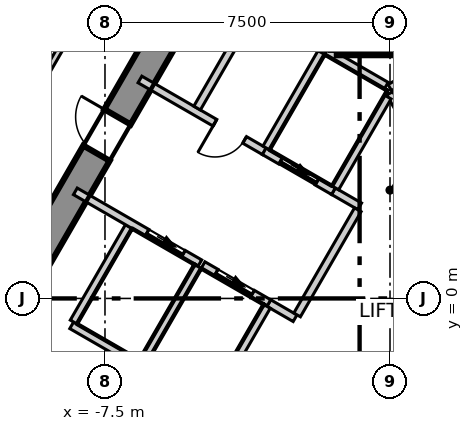
"""IFC4 building model, lengths in metres.
Left out: names, types, materials, properties, quantities, classifications, styles, units other than length and angle.
Written with IfcOpenShell. Run it as: python <this file> out.ifc"""

import sys

from ifc_helpers import new_model, si_unit, direction, frame, frame_2d, origin, place, context, subcontext, project, spatial, polyline, rectangle, outline, extrude, element, fill, save


model = new_model("IFC4")
c1 = context("Model", 3, precision=1e-05, world=origin(), true_north=direction((0.0, 1.0)))
c2 = subcontext(c1, "Body", "Model", "MODEL_VIEW")
j1 = project(units=[si_unit("LENGTHUNIT", "METRE"), si_unit("PLANEANGLEUNIT", "RADIAN")], contexts=[c1])
p1 = place(None, origin())
s1 = spatial("IfcSite", under=j1, at=p1, CompositionType="ELEMENT")
p2 = place(p1, origin())
s2 = spatial("IfcBuilding", under=s1, at=p2, CompositionType="ELEMENT")
p3 = place(p2, frame((0.0, 0.0, 104.3)))
s3 = spatial("IfcBuildingStorey", under=s2, at=p3, CompositionType="ELEMENT", Elevation=104.3)
p4 = place(p3, frame((-1.674, 14.3, -0.3), z_axis=(0.0, 0.0, 1.0), x_axis=(-0.499995765644, -0.866027848477, 0.0)))
e1 = element("IfcWall", 1, at=p4, inside=s3, PredefinedType="SHEAR", context=c2, shape_type="SweptSolid", body=[
    extrude(outline(polyline([(-0.231, -0.4), (1.732, -0.4), (3.695, -0.4), (5.658, -0.4), (7.621, -0.4), (9.584, -0.4), (11.547, -0.4), (13.51, -0.4), (15.473, -0.4), (17.436, -0.4), (19.399, -0.4), (21.362, -0.4), (23.325, -0.4), (22.863, 0.4), (20.977, 0.4), (19.091, 0.4), (17.205, 0.4), (15.319, 0.4), (13.433, 0.4), (11.547, 0.4), (9.661, 0.4), (7.775, 0.4), (5.889, 0.4), (4.003, 0.4), (2.117, 0.4), (0.231, 0.4), (-0.231, -0.4)])), origin(), (0.0, 0.0, 1.0), 4.0),
])
p5 = place(p4, frame((10.997, 0.0, 0.3)))
e2 = element("IfcOpeningElement", 2, at=p5, cuts=e1, PredefinedType="OPENING", context=c2, shape_type="SweptSolid", body=[
    extrude(rectangle(XDim=1.1, YDim=2.1, at=frame_2d((0.55, 1.05))), frame((0.0, 0.41, 0.0), z_axis=(0.0, -1.0, 0.0), x_axis=(1.0, 0.0, 0.0)), (0.0, 0.0, 1.0), 0.82),
])
p6 = place(p4, frame((4.474, 0.0, 0.3)))
e3 = element("IfcOpeningElement", 3, at=p6, cuts=e1, PredefinedType="OPENING", context=c2, shape_type="SweptSolid", body=[
    extrude(rectangle(XDim=0.9, YDim=2.1, at=frame_2d((0.45, 1.05))), frame((0.0, 0.41, 0.0), z_axis=(0.0, -1.0, 0.0), x_axis=(1.0, 0.0, 0.0)), (0.0, 0.0, 1.0), 0.82),
])
p7 = place(p3, frame((-3.2, 35.691, 0.0), z_axis=(0.0, 0.0, 1.0), x_axis=(-0.500010127185, -0.866019556773, 0.0)))
e4 = element("IfcWall", 4, at=p7, inside=s3, PredefinedType="ELEMENTEDWALL", context=c2, shape_type="SweptSolid", body=[
    extrude(rectangle(XDim=58.599, YDim=0.2, at=frame_2d((29.299, 0.0))), origin(), (0.0, 0.0, 1.0), 3.7),
])
p8 = place(p7, frame((2.353, 0.0, 0.9)))
e5 = element("IfcOpeningElement", 5, at=p8, cuts=e4, PredefinedType="OPENING", context=c2, shape_type="SweptSolid", body=[
    extrude(rectangle(XDim=4.9, YDim=2.5, at=frame_2d((2.45, 1.25))), frame((0.0, 0.11, 0.0), z_axis=(0.0, -1.0, 0.0), x_axis=(1.0, 0.0, 0.0)), (0.0, 0.0, 1.0), 0.22),
])
p9 = place(p7, frame((9.355, 0.0, 0.9)))
e6 = element("IfcOpeningElement", 6, at=p9, cuts=e4, PredefinedType="OPENING", context=c2, shape_type="SweptSolid", body=[
    extrude(rectangle(XDim=4.9, YDim=2.5, at=frame_2d((2.45, 1.25))), frame((0.0, 0.11, 0.0), z_axis=(0.0, -1.0, 0.0), x_axis=(1.0, 0.0, 0.0)), (0.0, 0.0, 1.0), 0.22),
])
p10 = place(p7, frame((16.357, 0.0, 0.9)))
e7 = element("IfcOpeningElement", 7, at=p10, cuts=e4, PredefinedType="OPENING", context=c2, shape_type="SweptSolid", body=[
    extrude(rectangle(XDim=4.9, YDim=2.5, at=frame_2d((2.45, 1.25))), frame((0.0, 0.11, 0.0), z_axis=(0.0, -1.0, 0.0), x_axis=(1.0, 0.0, 0.0)), (0.0, 0.0, 1.0), 0.22),
])
p11 = place(p7, frame((23.358, 0.0, 0.9)))
e8 = element("IfcOpeningElement", 8, at=p11, cuts=e4, PredefinedType="OPENING", context=c2, shape_type="SweptSolid", body=[
    extrude(rectangle(XDim=4.9, YDim=2.5, at=frame_2d((2.45, 1.25))), frame((0.0, 0.11, 0.0), z_axis=(0.0, -1.0, 0.0), x_axis=(1.0, 0.0, 0.0)), (0.0, 0.0, 1.0), 0.22),
])
p12 = place(p7, frame((30.36, 0.0, 0.9)))
e9 = element("IfcOpeningElement", 9, at=p12, cuts=e4, PredefinedType="OPENING", context=c2, shape_type="SweptSolid", body=[
    extrude(rectangle(XDim=4.9, YDim=2.5, at=frame_2d((2.45, 1.25))), frame((0.0, 0.11, 0.0), z_axis=(0.0, -1.0, 0.0), x_axis=(1.0, 0.0, 0.0)), (0.0, 0.0, 1.0), 0.22),
])
p13 = place(p7, frame((37.362, 0.0, 0.9)))
e10 = element("IfcOpeningElement", 10, at=p13, cuts=e4, PredefinedType="OPENING", context=c2, shape_type="SweptSolid", body=[
    extrude(rectangle(XDim=4.9, YDim=2.5, at=frame_2d((2.45, 1.25))), frame((0.0, 0.11, 0.0), z_axis=(0.0, -1.0, 0.0), x_axis=(1.0, 0.0, 0.0)), (0.0, 0.0, 1.0), 0.22),
])
p14 = place(p7, frame((44.363, 0.0, 0.9)))
e11 = element("IfcOpeningElement", 11, at=p14, cuts=e4, PredefinedType="OPENING", context=c2, shape_type="SweptSolid", body=[
    extrude(rectangle(XDim=4.9, YDim=2.5, at=frame_2d((2.45, 1.25))), frame((0.0, 0.11, 0.0), z_axis=(0.0, -1.0, 0.0), x_axis=(1.0, 0.0, 0.0)), (0.0, 0.0, 1.0), 0.22),
])
p15 = place(p7, frame((51.365, 0.0, 0.9)))
e12 = element("IfcOpeningElement", 12, at=p15, cuts=e4, PredefinedType="OPENING", context=c2, shape_type="SweptSolid", body=[
    extrude(rectangle(XDim=4.9, YDim=2.5, at=frame_2d((2.45, 1.25))), frame((0.0, 0.11, 0.0), z_axis=(0.0, -1.0, 0.0), x_axis=(1.0, 0.0, 0.0)), (0.0, 0.0, 1.0), 0.22),
])
p16 = place(p3, frame((-18.631, -10.669, 0.0), z_axis=(0.0, 0.0, 1.0), x_axis=(0.500015596868, 0.866016398741, 0.0)))
e13 = element("IfcWall", 13, at=p16, inside=s3, PredefinedType="PARTITIONING", context=c2, shape_type="SweptSolid", body=[
    extrude(rectangle(XDim=24.656, YDim=0.15, at=frame_2d((12.328, 0.0))), origin(), (0.0, 0.0, 1.0), 3.7),
])
p17 = place(p16, frame((17.507, 0.0, 0.0)))
e14 = element("IfcOpeningElement", 14, at=p17, cuts=e13, PredefinedType="OPENING", context=c2, shape_type="SweptSolid", body=[
    extrude(rectangle(XDim=1.1, YDim=2.1, at=frame_2d((0.55, 1.05))), frame((0.0, 0.085, 0.0), z_axis=(0.0, -1.0, 0.0), x_axis=(1.0, 0.0, 0.0)), (0.0, 0.0, 1.0), 0.17),
])
p18 = place(p16, frame((5.104, 0.0, 0.0)))
e15 = element("IfcOpeningElement", 15, at=p18, cuts=e13, PredefinedType="OPENING", context=c2, shape_type="SweptSolid", body=[
    extrude(rectangle(XDim=1.1, YDim=2.1, at=frame_2d((0.55, 1.05))), frame((0.0, 0.085, 0.0), z_axis=(0.0, -1.0, 0.0), x_axis=(1.0, 0.0, 0.0)), (0.0, 0.0, 1.0), 0.17),
])
p19 = place(p3, frame((0.076, 21.468, 0.0), z_axis=(0.0, 0.0, 1.0), x_axis=(0.500024127084, -0.866011473558, 0.0)))
e16 = element("IfcWall", 16, at=p19, inside=s3, PredefinedType="PARTITIONING", context=c2, shape_type="SweptSolid", body=[
    extrude(rectangle(XDim=17.654, YDim=0.15, at=frame_2d((8.827, 0.0))), origin(), (0.0, 0.0, 1.0), 3.7),
])
p20 = place(p19, frame((8.104, 0.0, 0.0)))
e17 = element("IfcOpeningElement", 17, at=p20, cuts=e16, PredefinedType="OPENING", context=c2, shape_type="SweptSolid", body=[
    extrude(rectangle(XDim=1.1, YDim=2.1, at=frame_2d((0.55, 1.05))), frame((0.0, 0.085, 0.0), z_axis=(0.0, -1.0, 0.0), x_axis=(1.0, 0.0, 0.0)), (0.0, 0.0, 1.0), 0.17),
])
p21 = place(p19, frame((13.504, 0.0, 0.0)))
e18 = element("IfcOpeningElement", 18, at=p21, cuts=e16, PredefinedType="OPENING", context=c2, shape_type="SweptSolid", body=[
    extrude(rectangle(XDim=0.9, YDim=2.1, at=frame_2d((0.45, 1.05))), frame((0.0, 0.085, 0.0), z_axis=(0.0, -1.0, 0.0), x_axis=(1.0, 0.0, 0.0)), (0.0, 0.0, 1.0), 0.17),
])
p22 = place(p19, frame((1.6, 0.0, 0.0)))
e19 = element("IfcOpeningElement", 19, at=p22, cuts=e16, PredefinedType="OPENING", context=c2, shape_type="SweptSolid", body=[
    extrude(rectangle(XDim=1.1, YDim=2.1, at=frame_2d((0.55, 1.05))), frame((0.0, 0.085, 0.0), z_axis=(0.0, -1.0, 0.0), x_axis=(1.0, 0.0, 0.0)), (0.0, 0.0, 1.0), 0.17),
])
p23 = place(p3, frame((-8.376, -0.707, 0.0), z_axis=(0.0, 0.0, 1.0), x_axis=(0.866067520717, -0.499927044236, 0.0)))
e20 = element("IfcWall", 20, at=p23, inside=s3, PredefinedType="SOLIDWALL", context=c2, shape_type="SweptSolid", body=[
    extrude(rectangle(XDim=2.1, YDim=0.2, at=frame_2d((1.05, 0.0))), origin(), (0.0, 0.0, 1.0), 3.7),
])
p24 = place(p3, frame((-8.326, -0.62, 0.0), z_axis=(0.0, 0.0, 1.0), x_axis=(0.500023687443, 0.866011727401, 0.0)))
e21 = element("IfcWall", 21, at=p24, inside=s3, PredefinedType="SOLIDWALL", context=c2, shape_type="SweptSolid", body=[
    extrude(rectangle(XDim=2.9, YDim=0.2, at=frame_2d((1.45, 0.0))), origin(), (0.0, 0.0, 1.0), 3.7),
])
p25 = place(p3, frame((-0.002, 5.541, 0.0), z_axis=(0.0, 0.0, 1.0), x_axis=(0.86600155993, 0.500041296494, 0.0)))
e22 = element("IfcWall", 22, at=p25, inside=s3, PredefinedType="SOLIDWALL", context=c2, shape_type="SweptSolid", body=[
    extrude(rectangle(XDim=4.132, YDim=0.2, at=frame_2d((2.066, 0.0))), origin(), (0.0, 0.0, 1.0), 3.7),
])
p26 = place(p3, frame((0.0, 5.4, 0.0), z_axis=(0.0, 0.0, 1.0), x_axis=(0.500103862429, -0.865965430478, 0.0)))
e23 = element("IfcWall", 23, at=p26, inside=s3, PredefinedType="SOLIDWALL", context=c2, shape_type="SweptSolid", body=[
    extrude(rectangle(XDim=2.973, YDim=0.2, at=frame_2d((1.487, 0.0))), origin(), (0.0, 0.0, 1.0), 3.7),
])
p27 = place(p26, frame((0.937, 0.0, 0.0)))
e24 = element("IfcOpeningElement", 24, at=p27, cuts=e23, PredefinedType="OPENING", context=c2, shape_type="SweptSolid", body=[
    extrude(rectangle(XDim=1.1, YDim=2.1, at=frame_2d((0.55, 1.05))), frame((0.0, 0.11, 0.0), z_axis=(0.0, -1.0, 0.0), x_axis=(1.0, 0.0, 0.0)), (0.0, 0.0, 1.0), 0.22),
])
p28 = place(p3, frame((-8.28, 2.818, 0.0), z_axis=(0.0, 0.0, 1.0), x_axis=(0.86600175068, -0.50004096614, 0.0)))
e25 = element("IfcWall", 25, at=p28, inside=s3, PredefinedType="SOLIDWALL", context=c2, shape_type="SweptSolid", body=[
    extrude(rectangle(XDim=3.782, YDim=0.2, at=frame_2d((1.891, 0.0))), origin(), (0.0, 0.0, 1.0), 3.7),
])
p29 = place(p28, frame((2.18, 0.0, 0.0)))
e26 = element("IfcOpeningElement", 26, at=p29, cuts=e25, PredefinedType="OPENING", context=c2, shape_type="SweptSolid", body=[
    extrude(rectangle(XDim=1.1, YDim=2.1, at=frame_2d((0.55, 1.05))), frame((0.0, 0.11, 0.0), z_axis=(0.0, -1.0, 0.0), x_axis=(1.0, 0.0, 0.0)), (0.0, 0.0, 1.0), 0.22),
])
p30 = place(p3, frame((-3.188, -0.122, 0.0), z_axis=(0.0, 0.0, 1.0), x_axis=(0.865705793592, -0.50055317294, 0.0)))
e27 = element("IfcWall", 27, at=p30, inside=s3, PredefinedType="SOLIDWALL", context=c2, shape_type="SweptSolid", body=[
    extrude(rectangle(XDim=0.797, YDim=0.2, at=frame_2d((0.398, 0.0))), origin(), (0.0, 0.0, 1.0), 3.7),
])
p31 = place(p3, frame((-6.58, 5.762, 0.0), z_axis=(0.0, 0.0, 1.0), x_axis=(0.866029704776, -0.49999255039, 0.0)))
e28 = element("IfcWall", 28, at=p31, inside=s3, PredefinedType="SOLIDWALL", context=c2, shape_type="SweptSolid", body=[
    extrude(rectangle(XDim=3.782, YDim=0.2, at=frame_2d((1.891, 0.0))), origin(), (0.0, 0.0, 1.0), 3.7),
])
p32 = place(p31, frame((2.279, 0.0, 0.0)))
e29 = element("IfcOpeningElement", 29, at=p32, cuts=e28, PredefinedType="OPENING", context=c2, shape_type="SweptSolid", body=[
    extrude(rectangle(XDim=0.9, YDim=2.1, at=frame_2d((0.45, 1.05))), frame((0.0, 0.11, 0.0), z_axis=(0.0, -1.0, 0.0), x_axis=(1.0, 0.0, 0.0)), (0.0, 0.0, 1.0), 0.22),
])
p33 = place(p3, frame((-1.488, 2.822, 0.0), z_axis=(0.0, 0.0, 1.0), x_axis=(0.866236612152, -0.499633997809, 0.0)))
e30 = element("IfcWall", 30, at=p33, inside=s3, PredefinedType="SOLIDWALL", context=c2, shape_type="SweptSolid", body=[
    extrude(rectangle(XDim=0.796, YDim=0.2, at=frame_2d((0.398, 0.0))), origin(), (0.0, 0.0, 1.0), 3.7),
])
p34 = place(p3, frame((-5.076, 5.009, 0.0), z_axis=(0.0, 0.0, 1.0), x_axis=(0.50002537861, 0.866010750942, 0.0)))
e31 = element("IfcWall", 31, at=p34, inside=s3, PredefinedType="SOLIDWALL", context=c2, shape_type="SweptSolid", body=[
    extrude(rectangle(XDim=3.0, YDim=0.2, at=frame_2d((1.5, 0.0))), origin(), (0.0, 0.0, 1.0), 3.7),
])
p35 = place(p3, frame((-3.489, 7.557, 0.0), z_axis=(0.0, 0.0, 1.0), x_axis=(0.866010750942, -0.50002537861, 0.0)))
e32 = element("IfcWall", 32, at=p35, inside=s3, PredefinedType="SOLIDWALL", context=c2, shape_type="SweptSolid", body=[
    extrude(rectangle(XDim=2.0, YDim=0.2, at=frame_2d((1.0, 0.0))), origin(), (0.0, 0.0, 1.0), 3.7),
])
p36 = place(p3, frame((-2.444, -0.433, 0.0), z_axis=(0.0, 0.0, 1.0), x_axis=(0.500035624827, 0.866004834804, 0.0)))
e33 = element("IfcWall", 33, at=p36, inside=s3, PredefinedType="SOLIDWALL", context=c2, shape_type="SweptSolid", body=[
    extrude(rectangle(XDim=3.194, YDim=0.2, at=frame_2d((1.597, 0.0))), origin(), (0.0, 0.0, 1.0), 3.7),
])
p37 = place(p3, frame((-6.507, -1.67, 0.0), z_axis=(0.0, 0.0, 1.0), x_axis=(0.50012328804, 0.865954211699, 0.0)))
e34 = element("IfcWall", 34, at=p37, inside=s3, PredefinedType="SOLIDWALL", context=c2, shape_type="SweptSolid", body=[
    extrude(rectangle(XDim=2.9, YDim=0.2, at=frame_2d((1.45, 0.0))), origin(), (0.0, 0.0, 1.0), 3.7),
])
p38 = place(p3, frame((-4.92, 0.878, 0.0), z_axis=(0.0, 0.0, 1.0), x_axis=(0.866010750942, -0.50002537861, 0.0)))
e35 = element("IfcWall", 35, at=p38, inside=s3, PredefinedType="SOLIDWALL", context=c2, shape_type="SweptSolid", body=[
    extrude(rectangle(XDim=2.0, YDim=0.2, at=frame_2d((1.0, 0.0))), origin(), (0.0, 0.0, 1.0), 3.7),
])
p39 = place(p38, frame((0.4, 0.0, 0.0)))
e36 = element("IfcOpeningElement", 36, at=p39, cuts=e35, PredefinedType="OPENING", context=c2, shape_type="SweptSolid", body=[
    extrude(rectangle(XDim=1.1, YDim=2.1, at=frame_2d((0.55, 1.05))), frame((0.0, 0.11, 0.0), z_axis=(0.0, -1.0, 0.0), x_axis=(1.0, 0.0, 0.0)), (0.0, 0.0, 1.0), 0.22),
])
p40 = place(p3, frame((-4.619, -2.6, 0.0), z_axis=(0.0, 0.0, 1.0), x_axis=(0.50009492287, 0.865970593103, 0.0)))
e37 = element("IfcWall", 37, at=p40, inside=s3, PredefinedType="SOLIDWALL", context=c2, shape_type="SweptSolid", body=[
    extrude(rectangle(XDim=2.761, YDim=0.2, at=frame_2d((1.381, 0.0))), origin(), (0.0, 0.0, 1.0), 3.7),
])
p41 = place(p3, frame((-3.309, 3.873, 0.0), z_axis=(0.0, 0.0, 1.0), x_axis=(0.866098583652, -0.499873227325, 0.0)))
e38 = element("IfcWall", 38, at=p41, inside=s3, PredefinedType="SOLIDWALL", context=c2, shape_type="SweptSolid", body=[
    extrude(rectangle(XDim=2.103, YDim=0.2, at=frame_2d((1.051, 0.0))), origin(), (0.0, 0.0, 1.0), 3.7),
])
p42 = place(p41, frame((0.502, 0.0, 0.0)))
e39 = element("IfcOpeningElement", 39, at=p42, cuts=e38, PredefinedType="OPENING", context=c2, shape_type="SweptSolid", body=[
    extrude(rectangle(XDim=1.1, YDim=2.1, at=frame_2d((0.55, 1.05))), frame((0.0, 0.11, 0.0), z_axis=(0.0, -1.0, 0.0), x_axis=(1.0, 0.0, 0.0)), (0.0, 0.0, 1.0), 0.22),
])
p43 = place(p3, frame((-3.257, 3.959, 0.0), z_axis=(0.0, 0.0, 1.0), x_axis=(0.50012328804, 0.865954211699, 0.0)))
e40 = element("IfcWall", 40, at=p43, inside=s3, PredefinedType="SOLIDWALL", context=c2, shape_type="SweptSolid", body=[
    extrude(rectangle(XDim=2.9, YDim=0.2, at=frame_2d((1.45, 0.0))), origin(), (0.0, 0.0, 1.0), 3.7),
])
p44 = place(p3, frame((-1.67, 6.507, 0.0), z_axis=(0.0, 0.0, 1.0), x_axis=(0.865941441609, -0.500145398563, 0.0)))
e41 = element("IfcWall", 41, at=p44, inside=s3, PredefinedType="SOLIDWALL", context=c2, shape_type="SweptSolid", body=[
    extrude(rectangle(XDim=1.815, YDim=0.2, at=frame_2d((0.908, 0.0))), origin(), (0.0, 0.0, 1.0), 3.7),
])
p45 = place(p3, frame((-1.438, 2.909, 0.0), z_axis=(0.0, 0.0, 1.0), x_axis=(0.499829630636, 0.866123744241, 0.0)))
e42 = element("IfcWall", 42, at=p45, inside=s3, PredefinedType="SOLIDWALL", context=c2, shape_type="SweptSolid", body=[
    extrude(rectangle(XDim=2.761, YDim=0.2, at=frame_2d((1.38, 0.0))), origin(), (0.0, 0.0, 1.0), 3.7),
])
p46 = place(p3, frame((-1.4, 6.5, 0.0), z_axis=(0.0, 0.0, 1.0), x_axis=(1.0, 0.0, 0.0)))
e43 = element("IfcWall", 43, at=p46, inside=s3, PredefinedType="SOLIDWALL", context=c2, shape_type="SweptSolid", body=[
    extrude(rectangle(XDim=2.8, YDim=0.2, at=frame_2d((1.4, 0.0))), origin(), (0.0, 0.0, 1.0), 3.7),
])
p47 = place(p39, origin())
e44 = element("IfcDoor", 44, at=p47, inside=s3, OperationType="SLIDING_TO_LEFT", PredefinedType="DOOR", context=c2, shape_type="SweptSolid", body=[
    extrude(rectangle(XDim=1.1, YDim=2.1, at=frame_2d((0.55, 1.05))), frame((0.0, 0.025, 0.0), z_axis=(0.0, -1.0, 0.0), x_axis=(1.0, 0.0, 0.0)), (0.0, 0.0, 1.0), 0.05),
])
fill(e36, e44)
p48 = place(p42, origin())
e45 = element("IfcDoor", 45, at=p48, inside=s3, OperationType="SLIDING_TO_LEFT", PredefinedType="DOOR", context=c2, shape_type="SweptSolid", body=[
    extrude(rectangle(XDim=1.1, YDim=2.1, at=frame_2d((0.55, 1.05))), frame((0.0, 0.025, 0.0), z_axis=(0.0, -1.0, 0.0), x_axis=(1.0, 0.0, 0.0)), (0.0, 0.0, 1.0), 0.05),
])
fill(e39, e45)
p49 = place(p29, origin())
e46 = element("IfcDoor", 46, at=p49, inside=s3, OperationType="SLIDING_TO_LEFT", PredefinedType="DOOR", context=c2, shape_type="SweptSolid", body=[
    extrude(rectangle(XDim=1.1, YDim=2.1, at=frame_2d((0.55, 1.05))), frame((0.0, 0.025, 0.0), z_axis=(0.0, -1.0, 0.0), x_axis=(1.0, 0.0, 0.0)), (0.0, 0.0, 1.0), 0.05),
])
fill(e26, e46)
p50 = place(p32, origin())
e47 = element("IfcDoor", 47, at=p50, inside=s3, OperationType="SINGLE_SWING_LEFT", PredefinedType="DOOR", context=c2, shape_type="SweptSolid", body=[
    extrude(rectangle(XDim=0.9, YDim=2.1, at=frame_2d((0.45, 1.05))), frame((0.0, 0.025, 0.0), z_axis=(0.0, -1.0, 0.0), x_axis=(1.0, 0.0, 0.0)), (0.0, 0.0, 1.0), 0.05),
])
fill(e29, e47)
p51 = place(p5, origin())
e48 = element("IfcDoor", 48, at=p51, inside=s3, OperationType="SINGLE_SWING_LEFT", PredefinedType="DOOR", context=c2, shape_type="SweptSolid", body=[
    extrude(rectangle(XDim=1.1, YDim=2.1, at=frame_2d((0.55, 1.05))), frame((0.0, 0.025, 0.0), z_axis=(0.0, -1.0, 0.0), x_axis=(1.0, 0.0, 0.0)), (0.0, 0.0, 1.0), 0.05),
])
fill(e2, e48)
save(model, sys.argv[1])
